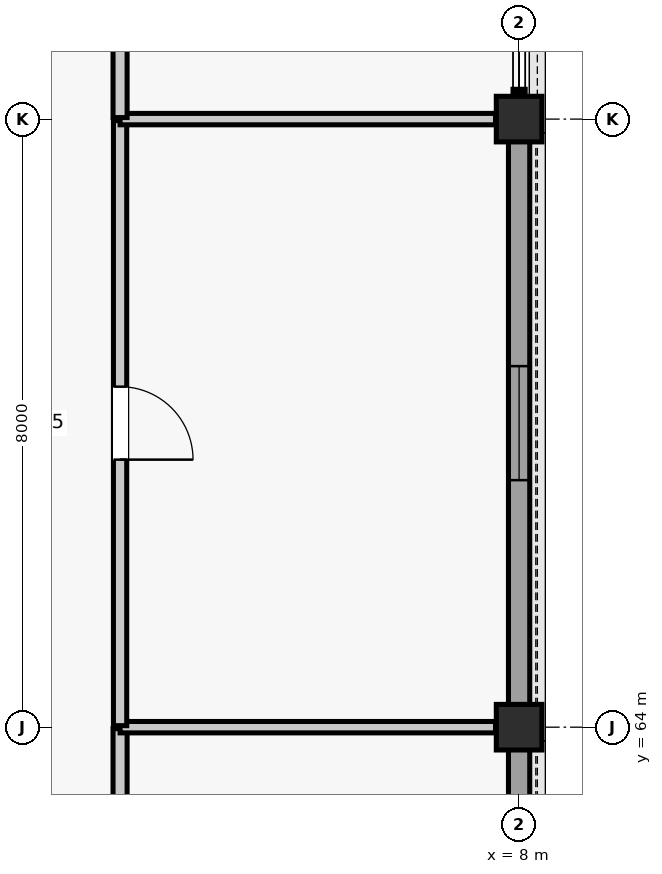
"""IFC4 building model, lengths in metres.
Left out: names, types, materials, properties, quantities, classifications, styles, units other than length and angle.
Written with IfcOpenShell. Run it as: python <this file> out.ifc"""

import sys

from ifc_helpers import new_model, si_unit, direction, frame, frame_2d, origin, origin_2d, place, context, subcontext, project, spatial, rectangle, extrude, element, fill, save


model = new_model("IFC4")
c1 = context("Model", 3, precision=1e-05, world=origin(), true_north=direction((0.0, 1.0)))
c2 = subcontext(c1, "Body", "Model", "MODEL_VIEW")
j1 = project(units=[si_unit("LENGTHUNIT", "METRE"), si_unit("PLANEANGLEUNIT", "RADIAN")], contexts=[c1])
p1 = place(None, origin())
s1 = spatial("IfcSite", under=j1, at=p1, CompositionType="ELEMENT")
p2 = place(p1, origin())
s2 = spatial("IfcBuilding", under=s1, at=p2, CompositionType="ELEMENT")
p3 = place(p2, frame((0.0, 0.0, 9.9)))
s3 = spatial("IfcBuildingStorey", under=s2, at=p3, CompositionType="ELEMENT", Elevation=9.9)
for number, where, z_axis, x_axis in (
    (1, (8.0, 64.0, 0.0), (0.0, 0.0, 1.0), (1.0, 0.0, 0.0)),
    (2, (8.0, 72.0, 0.0), (0.0, 0.0, 1.0), (1.0, 0.0, 0.0)),
):
    element("IfcColumn", number, at=place(p3, frame(where, z_axis=z_axis, x_axis=x_axis)), inside=s3, PredefinedType="COLUMN", context=c2, shape_type="SweptSolid", body=[
        extrude(rectangle(XDim=0.6, YDim=0.6, at=origin_2d()), origin(), (0.0, 0.0, 1.0), 3.96),
    ])
p4 = place(p3, frame((8.0, 56.285, 0.0), z_axis=(0.0, 0.0, 1.0), x_axis=(0.0, 1.0, 0.0)))
e3 = element("IfcWall", 3, at=p4, inside=s3, PredefinedType="SOLIDWALL", context=c2, shape_type="SweptSolid", body=[
    extrude(rectangle(XDim=7.43, YDim=0.28, at=frame_2d((3.715, 0.0))), origin(), (0.0, 0.0, 1.0), 3.284),
])
p5 = place(p4, frame((2.915, 0.0, 0.9)))
e4 = element("IfcOpeningElement", 4, at=p5, cuts=e3, PredefinedType="OPENING", context=c2, shape_type="SweptSolid", body=[
    extrude(rectangle(XDim=1.6, YDim=2.0, at=frame_2d((0.8, 1.0))), frame((0.0, 0.15, 0.0), z_axis=(0.0, -1.0, 0.0), x_axis=(1.0, 0.0, 0.0)), (0.0, 0.0, 1.0), 0.3),
])
p6 = place(p3, frame((8.0, 64.285, 0.0), z_axis=(0.0, 0.0, 1.0), x_axis=(0.0, 1.0, 0.0)))
e5 = element("IfcWall", 5, at=p6, inside=s3, PredefinedType="SOLIDWALL", context=c2, shape_type="SweptSolid", body=[
    extrude(rectangle(XDim=7.43, YDim=0.28, at=frame_2d((3.715, 0.0))), origin(), (0.0, 0.0, 1.0), 3.347),
])
p7 = place(p6, frame((2.965, 0.0, 0.9)))
e6 = element("IfcOpeningElement", 6, at=p7, cuts=e5, PredefinedType="OPENING", context=c2, shape_type="SweptSolid", body=[
    extrude(rectangle(XDim=1.5, YDim=1.9, at=frame_2d((0.75, 0.95))), frame((0.0, 0.15, 0.0), z_axis=(0.0, -1.0, 0.0), x_axis=(1.0, 0.0, 0.0)), (0.0, 0.0, 1.0), 0.3),
])
p8 = place(p3, frame((2.75, 56.02, 0.0), z_axis=(0.0, 0.0, 1.0), x_axis=(0.0, 1.0, 0.0)))
e7 = element("IfcWall", 7, at=p8, inside=s3, PredefinedType="PARTITIONING", context=c2, shape_type="SweptSolid", body=[
    extrude(rectangle(XDim=7.96, YDim=0.185, at=frame_2d((3.98, 0.0))), origin(), (0.0, 0.0, 1.0), 3.082),
])
p9 = place(p8, frame((3.46, 0.0, 0.0)))
e8 = element("IfcOpeningElement", 8, at=p9, cuts=e7, PredefinedType="OPENING", context=c2, shape_type="SweptSolid", body=[
    extrude(rectangle(XDim=1.04, YDim=2.18, at=frame_2d((0.52, 1.09))), frame((0.0, 0.103, 0.0), z_axis=(0.0, -1.0, 0.0), x_axis=(1.0, 0.0, 0.0)), (0.0, 0.0, 1.0), 0.205),
])
p10 = place(p3, frame((2.75, 64.0, 0.0), z_axis=(0.0, 0.0, 1.0), x_axis=(1.0, 0.0, 0.0)))
e9 = element("IfcWall", 9, at=p10, inside=s3, PredefinedType="PARTITIONING", context=c2, shape_type="SweptSolid", body=[
    extrude(rectangle(XDim=4.94, YDim=0.15, at=frame_2d((2.47, 0.0))), origin(), (0.0, 0.0, 1.0), 3.082),
])
p11 = place(p3, frame((2.75, 64.02, 0.0), z_axis=(0.0, 0.0, 1.0), x_axis=(0.0, 1.0, 0.0)))
e10 = element("IfcWall", 10, at=p11, inside=s3, PredefinedType="PARTITIONING", context=c2, shape_type="SweptSolid", body=[
    extrude(rectangle(XDim=7.96, YDim=0.175, at=frame_2d((3.98, 0.0))), origin(), (0.0, 0.0, 1.0), 3.082),
])
p12 = place(p11, frame((3.5, 0.0, 0.0)))
e11 = element("IfcOpeningElement", 11, at=p12, cuts=e10, PredefinedType="OPENING", context=c2, shape_type="SweptSolid", body=[
    extrude(rectangle(XDim=0.96, YDim=2.14, at=frame_2d((0.48, 1.07))), frame((0.0, 0.097, 0.0), z_axis=(0.0, -1.0, 0.0), x_axis=(1.0, 0.0, 0.0)), (0.0, 0.0, 1.0), 0.195),
])
p13 = place(p3, frame((2.75, 72.0, 0.0), z_axis=(0.0, 0.0, 1.0), x_axis=(1.0, 0.0, 0.0)))
e12 = element("IfcWall", 12, at=p13, inside=s3, PredefinedType="PARTITIONING", context=c2, shape_type="SweptSolid", body=[
    extrude(rectangle(XDim=4.94, YDim=0.15, at=frame_2d((2.47, 0.0))), origin(), (0.0, 0.0, 1.0), 3.157),
])
p14 = place(p3, frame((2.75, 72.02, 0.0), z_axis=(0.0, 0.0, 1.0), x_axis=(0.0, 1.0, 0.0)))
e13 = element("IfcWall", 13, at=p14, inside=s3, PredefinedType="PARTITIONING", context=c2, shape_type="SweptSolid", body=[
    extrude(rectangle(XDim=7.96, YDim=0.185, at=frame_2d((3.98, 0.0))), origin(), (0.0, 0.0, 1.0), 3.141),
])
p15 = place(p14, frame((3.42, 0.0, 0.0)))
e14 = element("IfcOpeningElement", 14, at=p15, cuts=e13, PredefinedType="OPENING", context=c2, shape_type="SweptSolid", body=[
    extrude(rectangle(XDim=1.12, YDim=2.22, at=frame_2d((0.56, 1.11))), frame((0.0, 0.103, 0.0), z_axis=(0.0, -1.0, 0.0), x_axis=(1.0, 0.0, 0.0)), (0.0, 0.0, 1.0), 0.205),
])
p16 = place(p7, origin())
e15 = element("IfcWindow", 15, at=p16, inside=s3, PartitioningType="SINGLE_PANEL", PredefinedType="WINDOW", context=c2, shape_type="SweptSolid", body=[
    extrude(rectangle(XDim=1.5, YDim=1.9, at=frame_2d((0.75, 0.95))), frame((0.0, 0.03, 0.0), z_axis=(0.0, -1.0, 0.0), x_axis=(1.0, 0.0, 0.0)), (0.0, 0.0, 1.0), 0.06),
])
fill(e6, e15)
p17 = place(p12, frame((0.96, 0.0, 0.0), z_axis=(0.0, 0.0, 1.0), x_axis=(-1.0, 0.0, 0.0)))
e16 = element("IfcDoor", 16, at=p17, inside=s3, OperationType="SINGLE_SWING_LEFT", PredefinedType="DOOR", context=c2, shape_type="SweptSolid", body=[
    extrude(rectangle(XDim=0.96, YDim=2.14, at=frame_2d((0.48, 1.07))), frame((0.0, 0.025, 0.0), z_axis=(0.0, -1.0, 0.0), x_axis=(1.0, 0.0, 0.0)), (0.0, 0.0, 1.0), 0.05),
])
fill(e11, e16)
save(model, sys.argv[1])
